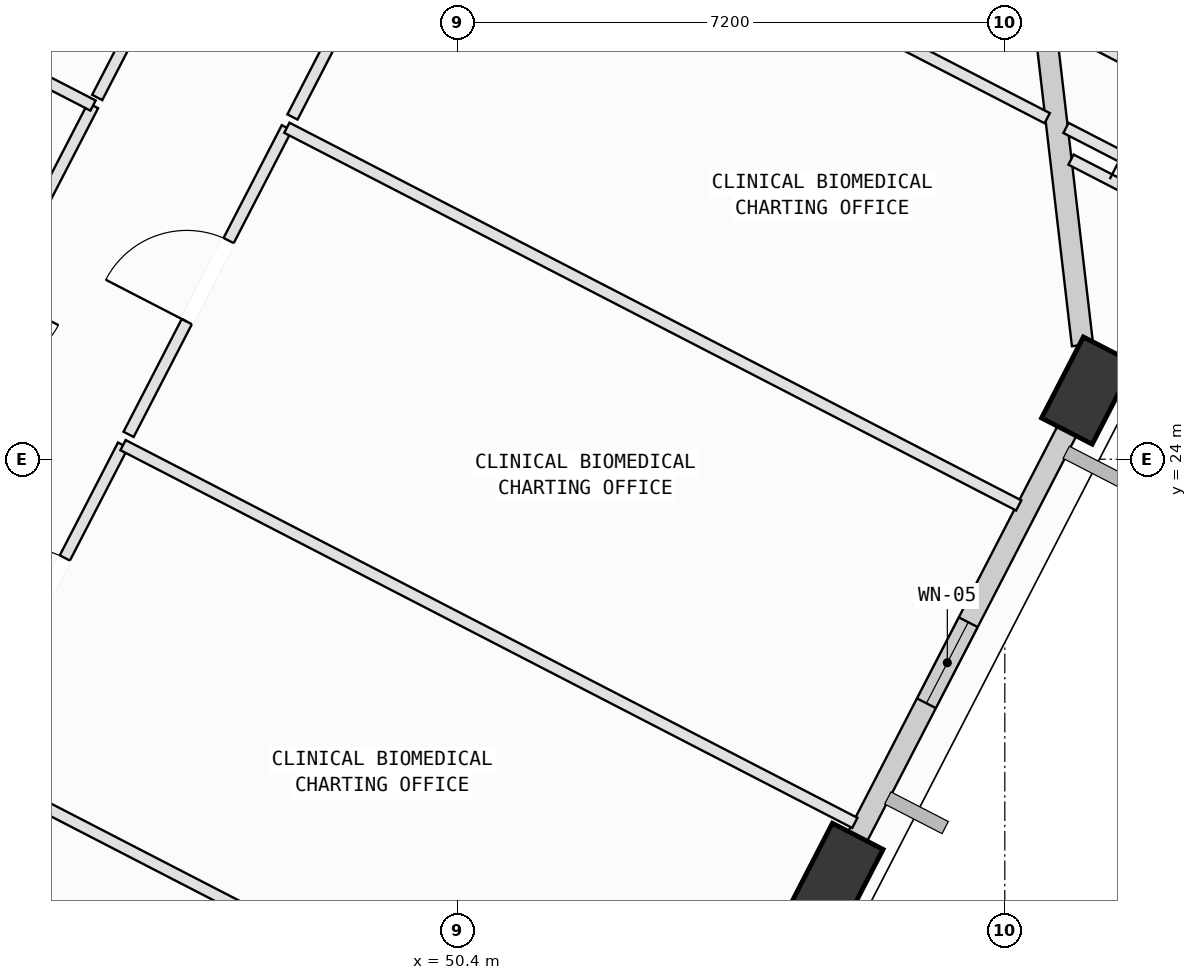
"""IFC4 building model, lengths in metres.
Left out: names, types, materials, properties, quantities, classifications, styles, units other than length and angle.
Written with IfcOpenShell. Run it as: python <this file> out.ifc"""

import sys

from ifc_helpers import new_model, si_unit, direction, frame, frame_2d, origin, origin_2d, place, context, subcontext, project, spatial, rectangle, extrude, element, fill, save


model = new_model("IFC4")
c1 = context("Model", 3, precision=1e-05, world=origin(), true_north=direction((0.0, 1.0)))
c2 = subcontext(c1, "Body", "Model", "MODEL_VIEW")
j1 = project(units=[si_unit("LENGTHUNIT", "METRE"), si_unit("PLANEANGLEUNIT", "RADIAN")], contexts=[c1])
p1 = place(None, origin())
s1 = spatial("IfcSite", under=j1, at=p1, CompositionType="ELEMENT")
p2 = place(p1, origin())
s2 = spatial("IfcBuilding", under=s1, at=p2, CompositionType="ELEMENT")
p3 = place(p2, frame((0.0, 0.0, 292.6)))
s3 = spatial("IfcBuildingStorey", under=s2, at=p3, CompositionType="ELEMENT", Elevation=292.6)
p4 = place(p3, frame((55.39, 18.505, 0.002), z_axis=(0.025241482781, 0.090139463812, 0.995609232887), x_axis=(-0.680227026132, -0.728266544912, 0.083180721816)))
e1 = element("IfcColumn", 1, at=p4, inside=s3, PredefinedType="COLUMN", context=c2, shape_type="SweptSolid", body=[
    extrude(rectangle(XDim=1.2, YDim=0.75, at=origin_2d()), origin(), (0.0, 0.0, 1.0), 4.014),
])
p5 = place(p3, frame((58.692, 24.903, 0.002), z_axis=(-0.001276024564, 0.103479515869, 0.994630766444), x_axis=(-0.447716651487, -0.88943410931, 0.091960671909)))
e2 = element("IfcColumn", 2, at=p5, inside=s3, PredefinedType="COLUMN", context=c2, shape_type="SweptSolid", body=[
    extrude(rectangle(XDim=1.2, YDim=0.75, at=origin_2d()), origin(), (0.0, 0.0, 1.0), 4.018),
])
p6 = place(p3, frame((55.293, 18.317, 0.0), z_axis=(0.0, 0.0, 1.0), x_axis=(-0.458654567853, -0.888614645045, 0.0)))
e3 = element("IfcWall", 3, at=p6, inside=s3, PredefinedType="SOLIDWALL", context=c2, shape_type="SweptSolid", body=[
    extrude(rectangle(XDim=6.407, YDim=0.28, at=frame_2d((3.203, 0.0))), origin(), (0.0, 0.0, 1.0), 3.265),
])
p7 = place(p6, frame((0.79, 0.0, 0.75)))
e4 = element("IfcOpeningElement", 4, at=p7, cuts=e3, PredefinedType="OPENING", context=c2, shape_type="SweptSolid", body=[
    extrude(rectangle(XDim=1.8, YDim=2.05, at=frame_2d((0.9, 1.025))), frame((0.0, 0.15, 0.0), z_axis=(0.0, -1.0, 0.0), x_axis=(1.0, 0.0, 0.0)), (0.0, 0.0, 1.0), 0.3),
])
p8 = place(p3, frame((58.6, 24.724, 0.0), z_axis=(0.0, 0.0, 1.0), x_axis=(-0.458648733121, -0.888617656592, 0.0)))
e5 = element("IfcWall", 5, at=p8, inside=s3, PredefinedType="SOLIDWALL", context=c2, shape_type="SweptSolid", body=[
    extrude(rectangle(XDim=6.418, YDim=0.28, at=frame_2d((3.209, 0.0))), origin(), (0.0, 0.0, 1.0), 3.265),
])
p9 = place(p8, frame((3.228, 0.0, 0.75)))
e6 = element("IfcOpeningElement", 6, at=p9, cuts=e5, PredefinedType="OPENING", context=c2, shape_type="SweptSolid", body=[
    extrude(rectangle(XDim=1.2, YDim=1.75, at=frame_2d((0.6, 0.875))), frame((0.0, 0.15, 0.0), z_axis=(0.0, -1.0, 0.0), x_axis=(1.0, 0.0, 0.0)), (0.0, 0.0, 1.0), 0.3),
])
p10 = place(p3, frame((58.009, 30.761, 0.0), z_axis=(0.0, 0.0, 1.0), x_axis=(0.115795015277, -0.993273131841, 0.0)))
e7 = element("IfcWall", 7, at=p10, inside=s3, PredefinedType="SOLIDWALL", context=c2, shape_type="SweptSolid", body=[
    extrude(rectangle(XDim=5.294, YDim=0.28, at=frame_2d((2.647, 0.0))), origin(), (0.0, 0.0, 1.0), 3.265),
])
p11 = place(p3, frame((43.843, 20.008, 0.0), z_axis=(0.0, 0.0, 1.0), x_axis=(0.888649389218, -0.458587246926, 0.0)))
e8 = element("IfcWall", 8, at=p11, inside=s3, PredefinedType="PARTITIONING", context=c2, shape_type="SweptSolid", body=[
    extrude(rectangle(XDim=10.835, YDim=0.15, at=frame_2d((5.418, 0.0))), origin(), (0.0, 0.0, 1.0), 3.78),
])
p12 = place(p3, frame((43.917, 20.15, 0.0), z_axis=(0.0, 0.0, 1.0), x_axis=(0.458533348006, 0.888677201669, 0.0)))
e9 = element("IfcWall", 9, at=p12, inside=s3, PredefinedType="PARTITIONING", context=c2, shape_type="SweptSolid", body=[
    extrude(rectangle(XDim=4.541, YDim=0.15, at=frame_2d((2.27, 0.0))), origin(), (0.0, 0.0, 1.0), 3.78),
])
p13 = place(p12, frame((1.67, 0.0, 0.0)))
e10 = element("IfcOpeningElement", 10, at=p13, cuts=e9, PredefinedType="OPENING", context=c2, shape_type="SweptSolid", body=[
    extrude(rectangle(XDim=1.2, YDim=2.15, at=frame_2d((0.6, 1.075))), frame((0.0, 0.085, 0.0), z_axis=(0.0, -1.0, 0.0), x_axis=(1.0, 0.0, 0.0)), (0.0, 0.0, 1.0), 0.17),
])
p14 = place(p3, frame((45.999, 24.185, 0.0), z_axis=(0.0, 0.0, 1.0), x_axis=(0.888593697923, -0.458695149321, 0.0)))
e11 = element("IfcWall", 11, at=p14, inside=s3, PredefinedType="PARTITIONING", context=c2, shape_type="SweptSolid", body=[
    extrude(rectangle(XDim=10.835, YDim=0.15, at=frame_2d((5.417, 0.0))), origin(), (0.0, 0.0, 1.0), 3.78),
])
p15 = place(p3, frame((55.86, 18.915, 0.0), z_axis=(0.0, 0.0, 1.0), x_axis=(-0.458273916957, -0.888811013116, 0.0)))
e12 = element("IfcWall", 12, at=p15, inside=s3, PredefinedType="PARTITIONING", context=c2, shape_type="SweptSolid", body=[
    extrude(rectangle(XDim=0.792, YDim=0.15, at=frame_2d((0.396, 0.0))), origin(), (0.0, 0.0, 1.0), 3.265),
])
p16 = place(p3, frame((46.072, 24.327, 0.0), z_axis=(0.0, 0.0, 1.0), x_axis=(0.458621001786, 0.888631969221, 0.0)))
e13 = element("IfcWall", 13, at=p16, inside=s3, PredefinedType="PARTITIONING", context=c2, shape_type="SweptSolid", body=[
    extrude(rectangle(XDim=4.54, YDim=0.15, at=frame_2d((2.27, 0.0))), origin(), (0.0, 0.0, 1.0), 3.78),
])
p17 = place(p16, frame((1.67, 0.0, 0.0)))
e14 = element("IfcOpeningElement", 14, at=p17, cuts=e13, PredefinedType="OPENING", context=c2, shape_type="SweptSolid", body=[
    extrude(rectangle(XDim=1.2, YDim=2.15, at=frame_2d((0.6, 1.075))), frame((0.0, 0.085, 0.0), z_axis=(0.0, -1.0, 0.0), x_axis=(1.0, 0.0, 0.0)), (0.0, 0.0, 1.0), 0.17),
])
p18 = place(p3, frame((48.154, 28.361, 0.0), z_axis=(0.0, 0.0, 1.0), x_axis=(0.888649389218, -0.458587246926, 0.0)))
e15 = element("IfcWall", 15, at=p18, inside=s3, PredefinedType="PARTITIONING", context=c2, shape_type="SweptSolid", body=[
    extrude(rectangle(XDim=10.835, YDim=0.15, at=frame_2d((5.418, 0.0))), origin(), (0.0, 0.0, 1.0), 3.78),
])
p19 = place(p3, frame((60.089, 27.108, 0.0), z_axis=(0.0, 0.0, 1.0), x_axis=(-0.45864291977, -0.888620657055, 0.0)))
e16 = element("IfcWall", 16, at=p19, inside=s3, PredefinedType="PARTITIONING", context=c2, shape_type="SweptSolid", body=[
    extrude(rectangle(XDim=2.802, YDim=0.15, at=frame_2d((1.401, 0.0))), origin(), (0.0, 0.0, 1.0), 3.265),
])
p20 = place(p3, frame((48.228, 28.503, 0.0), z_axis=(0.0, 0.0, 1.0), x_axis=(0.458533348006, 0.888677201669, 0.0)))
e17 = element("IfcWall", 17, at=p20, inside=s3, PredefinedType="PARTITIONING", context=c2, shape_type="SweptSolid", body=[
    extrude(rectangle(XDim=4.541, YDim=0.15, at=frame_2d((2.27, 0.0))), origin(), (0.0, 0.0, 1.0), 3.78),
])
p21 = place(p20, frame((1.67, 0.0, 0.0)))
e18 = element("IfcOpeningElement", 18, at=p21, cuts=e17, PredefinedType="OPENING", context=c2, shape_type="SweptSolid", body=[
    extrude(rectangle(XDim=1.2, YDim=2.15, at=frame_2d((0.6, 1.075))), frame((0.0, 0.085, 0.0), z_axis=(0.0, -1.0, 0.0), x_axis=(1.0, 0.0, 0.0)), (0.0, 0.0, 1.0), 0.17),
])
p22 = place(p3, frame((50.31, 32.538, 0.0), z_axis=(0.0, 0.0, 1.0), x_axis=(0.888597759836, -0.458687280415, 0.0)))
e19 = element("IfcWall", 19, at=p22, inside=s3, PredefinedType="PARTITIONING", context=c2, shape_type="SweptSolid", body=[
    extrude(rectangle(XDim=8.832, YDim=0.15, at=frame_2d((4.416, 0.0))), origin(), (0.0, 0.0, 1.0), 3.78),
])
p23 = place(p22, frame((3.986, 0.0, 0.0)))
e20 = element("IfcOpeningElement", 20, at=p23, cuts=e19, PredefinedType="OPENING", context=c2, shape_type="SweptSolid", body=[
    extrude(rectangle(XDim=0.86, YDim=2.06, at=frame_2d((0.43, 1.03))), frame((0.0, 0.085, 0.0), z_axis=(0.0, -1.0, 0.0), x_axis=(1.0, 0.0, 0.0)), (0.0, 0.0, 1.0), 0.17),
])
p24 = place(p3, frame((58.405, 28.359, 0.0), z_axis=(0.0, 0.0, 1.0), x_axis=(0.888761263452, -0.458370392354, 0.0)))
e21 = element("IfcWall", 21, at=p24, inside=s3, PredefinedType="PARTITIONING", context=c2, shape_type="SweptSolid", body=[
    extrude(rectangle(XDim=0.89, YDim=0.15, at=frame_2d((0.445, 0.0))), origin(), (0.0, 0.0, 1.0), 3.78),
])
p25 = place(p3, frame((58.471, 27.942, 0.0), z_axis=(0.0, 0.0, 1.0), x_axis=(0.88888850719, -0.458123587894, 0.0)))
e22 = element("IfcWall", 22, at=p25, inside=s3, PredefinedType="PARTITIONING", context=c2, shape_type="SweptSolid", body=[
    extrude(rectangle(XDim=1.821, YDim=0.15, at=frame_2d((0.91, 0.0))), origin(), (0.0, 0.0, 1.0), 3.78),
])
p26 = place(p3, frame((45.604, 28.653, 0.0), z_axis=(0.0, 0.0, 1.0), x_axis=(-0.458615052494, -0.888635039612, 0.0)))
e23 = element("IfcWall", 23, at=p26, inside=s3, PredefinedType="PARTITIONING", context=c2, shape_type="SweptSolid", body=[
    extrude(rectangle(XDim=6.472, YDim=0.15, at=frame_2d((3.236, 0.0))), origin(), (0.0, 0.0, 1.0), 3.78),
])
p27 = place(p26, frame((2.776, 0.0, 0.0)))
e24 = element("IfcOpeningElement", 24, at=p27, cuts=e23, PredefinedType="OPENING", context=c2, shape_type="SweptSolid", body=[
    extrude(rectangle(XDim=0.92, YDim=2.1, at=frame_2d((0.46, 1.05))), frame((0.0, 0.085, 0.0), z_axis=(0.0, -1.0, 0.0), x_axis=(1.0, 0.0, 0.0)), (0.0, 0.0, 1.0), 0.17),
])
p28 = place(p3, frame((38.997, 32.063, 0.0), z_axis=(0.0, 0.0, 1.0), x_axis=(0.888627132571, -0.45863037324, 0.0)))
e25 = element("IfcWall", 25, at=p28, inside=s3, PredefinedType="PARTITIONING", context=c2, shape_type="SweptSolid", body=[
    extrude(rectangle(XDim=7.435, YDim=0.15, at=frame_2d((3.718, 0.0))), origin(), (0.0, 0.0, 1.0), 3.78),
])
p29 = place(p3, frame((48.939, 35.115, 0.0), z_axis=(0.0, 0.0, 1.0), x_axis=(-0.458647267692, -0.888618412953, 0.0)))
e26 = element("IfcWall", 26, at=p29, inside=s3, PredefinedType="PARTITIONING", context=c2, shape_type="SweptSolid", body=[
    extrude(rectangle(XDim=7.152, YDim=0.15, at=frame_2d((3.576, 0.0))), origin(), (0.0, 0.0, 1.0), 3.78),
])
p30 = place(p29, frame((3.116, 0.0, 0.0)))
e27 = element("IfcOpeningElement", 27, at=p30, cuts=e26, PredefinedType="OPENING", context=c2, shape_type="SweptSolid", body=[
    extrude(rectangle(XDim=0.92, YDim=2.1, at=frame_2d((0.46, 1.05))), frame((0.0, 0.085, 0.0), z_axis=(0.0, -1.0, 0.0), x_axis=(1.0, 0.0, 0.0)), (0.0, 0.0, 1.0), 0.17),
])
p31 = place(p3, frame((58.395, 29.67, 0.0), z_axis=(0.0, 0.0, 1.0), x_axis=(0.88862493644, -0.458634628368, 0.0)))
e28 = element("IfcWall", 28, at=p31, inside=s3, PredefinedType="PARTITIONING", context=c2, shape_type="SweptSolid", body=[
    extrude(rectangle(XDim=1.5, YDim=0.15, at=frame_2d((0.75, 0.0))), origin(), (0.0, 0.0, 1.0), 3.78),
])
p32 = place(p9, origin())
e29 = element("IfcWindow", 29, at=p32, inside=s3, PartitioningType="SINGLE_PANEL", PredefinedType="WINDOW", context=c2, shape_type="SweptSolid", body=[
    extrude(rectangle(XDim=1.2, YDim=1.75, at=frame_2d((0.6, 0.875))), frame((0.0, 0.03, 0.0), z_axis=(0.0, -1.0, 0.0), x_axis=(1.0, 0.0, 0.0)), (0.0, 0.0, 1.0), 0.06),
])
fill(e6, e29)
p33 = place(p13, origin())
e30 = element("IfcDoor", 30, at=p33, inside=s3, OperationType="SINGLE_SWING_LEFT", PredefinedType="DOOR", context=c2, shape_type="SweptSolid", body=[
    extrude(rectangle(XDim=1.2, YDim=2.15, at=frame_2d((0.6, 1.075))), frame((0.0, 0.025, 0.0), z_axis=(0.0, -1.0, 0.0), x_axis=(1.0, 0.0, 0.0)), (0.0, 0.0, 1.0), 0.05),
])
fill(e10, e30)
p34 = place(p17, origin())
e31 = element("IfcDoor", 31, at=p34, inside=s3, OperationType="SINGLE_SWING_LEFT", PredefinedType="DOOR", context=c2, shape_type="SweptSolid", body=[
    extrude(rectangle(XDim=1.2, YDim=2.15, at=frame_2d((0.6, 1.075))), frame((0.0, 0.025, 0.0), z_axis=(0.0, -1.0, 0.0), x_axis=(1.0, 0.0, 0.0)), (0.0, 0.0, 1.0), 0.05),
])
fill(e14, e31)
save(model, sys.argv[1])
